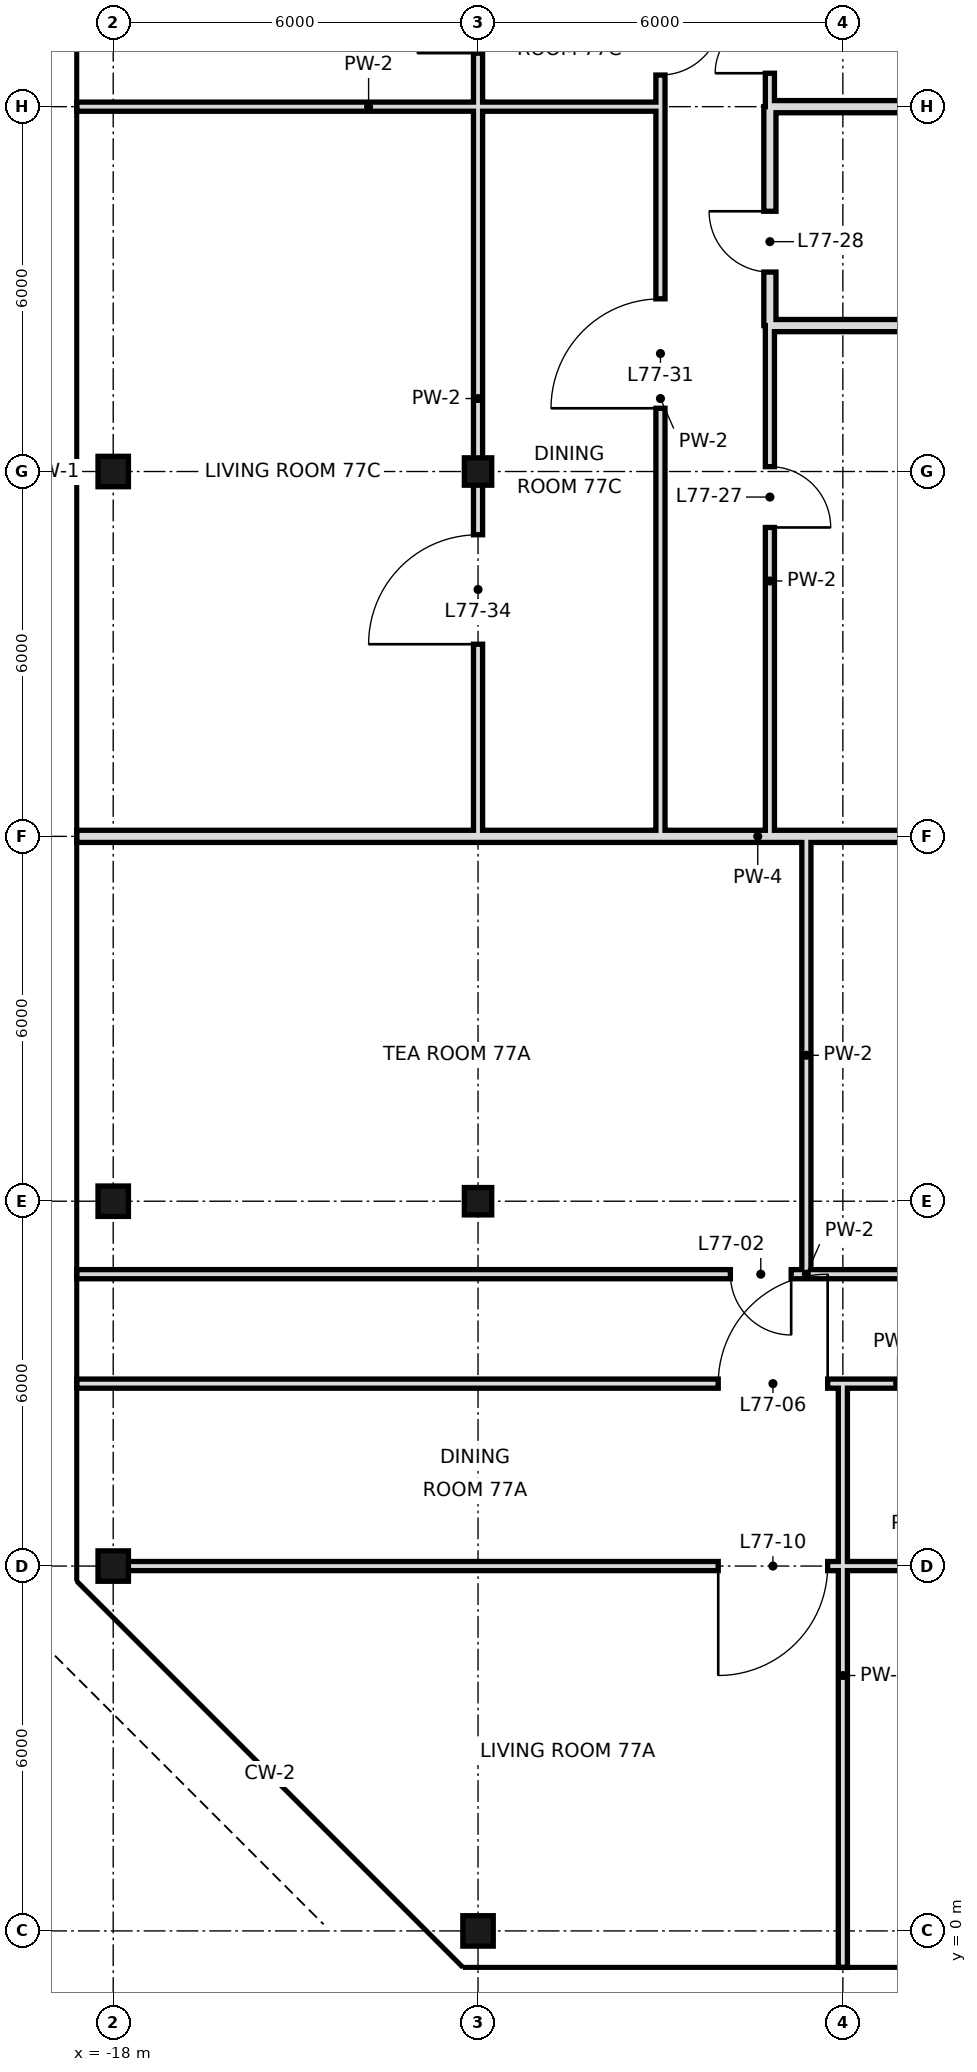
"""IFC4 building model, lengths in metres.
Left out: names, types, materials, properties, quantities, classifications, styles, units other than length and angle.
Written with IfcOpenShell. Run it as: python <this file> out.ifc"""

import sys

from ifc_helpers import new_model, si_unit, direction, frame, frame_2d, origin, origin_2d, place, context, subcontext, project, spatial, rectangle, hollow_rectangle, extrude, element, fill, save


model = new_model("IFC4")
c1 = context("Model", 3, precision=1e-05, world=origin(), true_north=direction((0.0, 1.0)))
c2 = subcontext(c1, "Body", "Model", "MODEL_VIEW")
j1 = project(units=[si_unit("LENGTHUNIT", "METRE"), si_unit("PLANEANGLEUNIT", "RADIAN")], contexts=[c1])
p1 = place(None, origin())
s1 = spatial("IfcSite", under=j1, at=p1, CompositionType="ELEMENT")
p2 = place(p1, origin())
s2 = spatial("IfcBuilding", under=s1, at=p2, CompositionType="ELEMENT")
p3 = place(p2, frame((0.0, 0.0, 323.2)))
s3 = spatial("IfcBuildingStorey", under=s2, at=p3, CompositionType="ELEMENT", Elevation=323.2)
for number, where, z_axis, x_axis in (
    (1, (-18.0, 6.0, 0.0), (0.0, 0.0, 1.0), (1.0, 0.0, 0.0)),
    (2, (-18.0, 12.0, 0.0), (0.0, 0.0, 1.0), (1.0, 0.0, 0.0)),
    (3, (-18.0, 24.0, 0.0), (0.0, 0.0, 1.0), (1.0, 0.0, 0.0)),
    (4, (-12.0, 0.0, 0.0), (0.0, 0.0, 1.0), (1.0, 0.0, 0.0)),
):
    element("IfcColumn", number, at=place(p3, frame(where, z_axis=z_axis, x_axis=x_axis)), inside=s3, PredefinedType="COLUMN", context=c2, shape_type="SweptSolid", body=[
        extrude(hollow_rectangle(XDim=0.5, YDim=0.5, WallThickness=0.025, at=origin_2d()), origin(), (0.0, 0.0, 1.0), 3.6),
    ])
for number, where, z_axis, x_axis in (
    (5, (-12.0, 12.0, 0.0), (0.0, 0.0, 1.0), (1.0, 0.0, 0.0)),
    (6, (-12.0, 24.0, 0.0), (0.0, 0.0, 1.0), (1.0, 0.0, 0.0)),
):
    element("IfcColumn", number, at=place(p3, frame(where, z_axis=z_axis, x_axis=x_axis)), inside=s3, PredefinedType="COLUMN", context=c2, shape_type="SweptSolid", body=[
        extrude(hollow_rectangle(XDim=0.45, YDim=0.45, WallThickness=0.022, at=origin_2d()), origin(), (0.0, 0.0, 1.0), 3.6),
    ])
p4 = place(p3, frame((-12.0, 18.0, 0.0), z_axis=(0.0, 0.0, 1.0), x_axis=(0.0, 1.0, 0.0)))
e7 = element("IfcWall", 7, at=p4, inside=s3, PredefinedType="PARTITIONING", context=c2, shape_type="SweptSolid", body=[
    extrude(rectangle(XDim=14.4, YDim=0.15, at=frame_2d((7.2, 0.0))), origin(), (0.0, 0.0, 1.0), 2.72),
])
p5 = place(p4, frame((3.16, 0.0, 0.0)))
e8 = element("IfcOpeningElement", 8, at=p5, cuts=e7, PredefinedType="OPENING", context=c2, shape_type="SweptSolid", body=[
    extrude(rectangle(XDim=1.8, YDim=2.4, at=frame_2d((0.9, 1.2))), frame((0.0, 0.085, 0.0), z_axis=(0.0, -1.0, 0.0), x_axis=(1.0, 0.0, 0.0)), (0.0, 0.0, 1.0), 0.17),
])
p6 = place(p4, frame((12.88, 0.0, 0.0)))
e9 = element("IfcOpeningElement", 9, at=p6, cuts=e7, PredefinedType="OPENING", context=c2, shape_type="SweptSolid", body=[
    extrude(rectangle(XDim=1.0, YDim=2.4, at=frame_2d((0.5, 1.2))), frame((0.0, 0.085, 0.0), z_axis=(0.0, -1.0, 0.0), x_axis=(1.0, 0.0, 0.0)), (0.0, 0.0, 1.0), 0.17),
])
p7 = place(p3, frame((-6.0, -0.6, 0.0), z_axis=(0.0, 0.0, 1.0), x_axis=(0.0, 1.0, 0.0)))
e10 = element("IfcWall", 10, at=p7, inside=s3, PredefinedType="PARTITIONING", context=c2, shape_type="SweptSolid", body=[
    extrude(rectangle(XDim=9.6, YDim=0.15, at=frame_2d((4.8, 0.0))), origin(), (0.0, 0.0, 1.0), 3.42),
])
p8 = place(p3, frame((-6.6, 10.8, 0.0), z_axis=(0.0, 0.0, 1.0), x_axis=(0.0, 1.0, 0.0)))
e11 = element("IfcWall", 11, at=p8, inside=s3, PredefinedType="PARTITIONING", context=c2, shape_type="SweptSolid", body=[
    extrude(rectangle(XDim=7.2, YDim=0.15, at=frame_2d((3.6, 0.0))), origin(), (0.0, 0.0, 1.0), 3.42),
])
p9 = place(p3, frame((-7.2, 26.4, 0.0), z_axis=(0.0, 0.0, 1.0), x_axis=(0.0, 1.0, 0.0)))
e12 = element("IfcWall", 12, at=p9, inside=s3, PredefinedType="SOLIDWALL", context=c2, shape_type="SweptSolid", body=[
    extrude(rectangle(XDim=3.6, YDim=0.2, at=frame_2d((1.8, 0.0))), origin(), (0.0, 0.0, 1.0), 2.72),
])
p10 = place(p9, frame((0.88, 0.0, 0.0)))
e13 = element("IfcOpeningElement", 13, at=p10, cuts=e12, PredefinedType="OPENING", context=c2, shape_type="SweptSolid", body=[
    extrude(rectangle(XDim=1.0, YDim=2.4, at=frame_2d((0.5, 1.2))), frame((0.0, 0.11, 0.0), z_axis=(0.0, -1.0, 0.0), x_axis=(1.0, 0.0, 0.0)), (0.0, 0.0, 1.0), 0.22),
])
p11 = place(p3, frame((-7.2, 18.0, 0.0), z_axis=(0.0, 0.0, 1.0), x_axis=(0.0, 1.0, 0.0)))
e14 = element("IfcWall", 14, at=p11, inside=s3, PredefinedType="PARTITIONING", context=c2, shape_type="SweptSolid", body=[
    extrude(rectangle(XDim=8.4, YDim=0.15, at=frame_2d((4.2, 0.0))), origin(), (0.0, 0.0, 1.0), 3.42),
])
p12 = place(p11, frame((5.08, 0.0, 0.0)))
e15 = element("IfcOpeningElement", 15, at=p12, cuts=e14, PredefinedType="OPENING", context=c2, shape_type="SweptSolid", body=[
    extrude(rectangle(XDim=1.0, YDim=2.4, at=frame_2d((0.5, 1.2))), frame((0.0, 0.085, 0.0), z_axis=(0.0, -1.0, 0.0), x_axis=(1.0, 0.0, 0.0)), (0.0, 0.0, 1.0), 0.17),
])
p13 = place(p3, frame((-7.2, 30.0, 0.0), z_axis=(0.0, 0.0, 1.0), x_axis=(0.0, 1.0, 0.0)))
e16 = element("IfcWall", 16, at=p13, inside=s3, PredefinedType="PARTITIONING", context=c2, shape_type="SweptSolid", body=[
    extrude(rectangle(XDim=2.4, YDim=0.15, at=frame_2d((1.2, 0.0))), origin(), (0.0, 0.0, 1.0), 3.42),
])
p14 = place(p13, frame((0.55, 0.0, 0.0)))
e17 = element("IfcOpeningElement", 17, at=p14, cuts=e16, PredefinedType="OPENING", context=c2, shape_type="SweptSolid", body=[
    extrude(rectangle(XDim=0.9, YDim=2.4, at=frame_2d((0.45, 1.2))), frame((0.0, 0.085, 0.0), z_axis=(0.0, -1.0, 0.0), x_axis=(1.0, 0.0, 0.0)), (0.0, 0.0, 1.0), 0.17),
])
p15 = place(p3, frame((-9.0, 18.0, 0.0), z_axis=(0.0, 0.0, 1.0), x_axis=(0.0, 1.0, 0.0)))
e18 = element("IfcWall", 18, at=p15, inside=s3, PredefinedType="PARTITIONING", context=c2, shape_type="SweptSolid", body=[
    extrude(rectangle(XDim=14.4, YDim=0.15, at=frame_2d((7.2, 0.0))), origin(), (0.0, 0.0, 1.0), 3.42),
])
p16 = place(p15, frame((7.04, 0.0, 0.0)))
e19 = element("IfcOpeningElement", 19, at=p16, cuts=e18, PredefinedType="OPENING", context=c2, shape_type="SweptSolid", body=[
    extrude(rectangle(XDim=1.8, YDim=2.4, at=frame_2d((0.9, 1.2))), frame((0.0, 0.085, 0.0), z_axis=(0.0, -1.0, 0.0), x_axis=(1.0, 0.0, 0.0)), (0.0, 0.0, 1.0), 0.17),
])
p17 = place(p15, frame((12.52, 0.0, 0.0)))
e20 = element("IfcOpeningElement", 20, at=p17, cuts=e18, PredefinedType="OPENING", context=c2, shape_type="SweptSolid", body=[
    extrude(rectangle(XDim=1.0, YDim=2.4, at=frame_2d((0.5, 1.2))), frame((0.0, 0.085, 0.0), z_axis=(0.0, -1.0, 0.0), x_axis=(1.0, 0.0, 0.0)), (0.0, 0.0, 1.0), 0.17),
])
p18 = place(p3, frame((-18.6, 10.8, 0.0), z_axis=(0.0, 0.0, 1.0), x_axis=(1.0, 0.0, 0.0)))
e21 = element("IfcWall", 21, at=p18, inside=s3, PredefinedType="PARTITIONING", context=c2, shape_type="SweptSolid", body=[
    extrude(rectangle(XDim=24.0, YDim=0.15, at=frame_2d((12.0, 0.0))), origin(), (0.0, 0.0, 1.0), 3.42),
])
p19 = place(p18, frame((10.75, 0.0, 0.0)))
e22 = element("IfcOpeningElement", 22, at=p19, cuts=e21, PredefinedType="OPENING", context=c2, shape_type="SweptSolid", body=[
    extrude(rectangle(XDim=1.0, YDim=2.4, at=frame_2d((0.5, 1.2))), frame((0.0, 0.085, 0.0), z_axis=(0.0, -1.0, 0.0), x_axis=(1.0, 0.0, 0.0)), (0.0, 0.0, 1.0), 0.17),
])
p20 = place(p18, frame((15.4, 0.0, 0.0)))
e23 = element("IfcOpeningElement", 23, at=p20, cuts=e21, PredefinedType="OPENING", context=c2, shape_type="SweptSolid", body=[
    extrude(rectangle(XDim=1.0, YDim=2.4, at=frame_2d((0.5, 1.2))), frame((0.0, 0.085, 0.0), z_axis=(0.0, -1.0, 0.0), x_axis=(1.0, 0.0, 0.0)), (0.0, 0.0, 1.0), 0.17),
])
p21 = place(p3, frame((-18.6, 18.0, 0.0), z_axis=(0.0, 0.0, 1.0), x_axis=(1.0, 0.0, 0.0)))
e24 = element("IfcWall", 24, at=p21, inside=s3, PredefinedType="SOLIDWALL", context=c2, shape_type="SweptSolid", body=[
    extrude(rectangle(XDim=21.7, YDim=0.2, at=frame_2d((10.85, 0.0))), origin(), (0.0, 0.0, 1.0), 2.72),
])
for number, where, z_axis, x_axis in (
    (25, (-7.2, 26.4, 0.0), (0.0, 0.0, 1.0), (1.0, 0.0, 0.0)),
    (26, (-7.2, 30.0, 0.0), (0.0, 0.0, 1.0), (1.0, 0.0, 0.0)),
):
    element("IfcWall", number, at=place(p3, frame(where, z_axis=z_axis, x_axis=x_axis)), inside=s3, PredefinedType="SOLIDWALL", context=c2, shape_type="SweptSolid", body=[
        extrude(rectangle(XDim=10.3, YDim=0.2, at=frame_2d((5.15, 0.0))), origin(), (0.0, 0.0, 1.0), 2.72),
    ])
p22 = place(p3, frame((-18.6, 30.0, 0.0), z_axis=(0.0, 0.0, 1.0), x_axis=(1.0, 0.0, 0.0)))
e27 = element("IfcWall", 27, at=p22, inside=s3, PredefinedType="PARTITIONING", context=c2, shape_type="SweptSolid", body=[
    extrude(rectangle(XDim=9.6, YDim=0.15, at=frame_2d((4.8, 0.0))), origin(), (0.0, 0.0, 1.0), 2.72),
])
p23 = place(p3, frame((-18.0, 6.0, 0.0), z_axis=(0.0, 0.0, 1.0), x_axis=(1.0, 0.0, 0.0)))
e28 = element("IfcWall", 28, at=p23, inside=s3, PredefinedType="PARTITIONING", context=c2, shape_type="SweptSolid", body=[
    extrude(rectangle(XDim=26.4, YDim=0.15, at=frame_2d((13.2, 0.0))), origin(), (0.0, 0.0, 1.0), 2.72),
])
p24 = place(p23, frame((9.95, 0.0, 0.0)))
e29 = element("IfcOpeningElement", 29, at=p24, cuts=e28, PredefinedType="OPENING", context=c2, shape_type="SweptSolid", body=[
    extrude(rectangle(XDim=1.8, YDim=2.4, at=frame_2d((0.9, 1.2))), frame((0.0, 0.085, 0.0), z_axis=(0.0, -1.0, 0.0), x_axis=(1.0, 0.0, 0.0)), (0.0, 0.0, 1.0), 0.17),
])
p25 = place(p23, frame((19.04, 0.0, 0.0)))
e30 = element("IfcOpeningElement", 30, at=p25, cuts=e28, PredefinedType="OPENING", context=c2, shape_type="SweptSolid", body=[
    extrude(rectangle(XDim=1.8, YDim=2.4, at=frame_2d((0.9, 1.2))), frame((0.0, 0.085, 0.0), z_axis=(0.0, -1.0, 0.0), x_axis=(1.0, 0.0, 0.0)), (0.0, 0.0, 1.0), 0.17),
])
p26 = place(p23, frame((24.88, 0.0, 0.0)))
e31 = element("IfcOpeningElement", 31, at=p26, cuts=e28, PredefinedType="OPENING", context=c2, shape_type="SweptSolid", body=[
    extrude(rectangle(XDim=1.0, YDim=2.4, at=frame_2d((0.5, 1.2))), frame((0.0, 0.085, 0.0), z_axis=(0.0, -1.0, 0.0), x_axis=(1.0, 0.0, 0.0)), (0.0, 0.0, 1.0), 0.17),
])
p27 = place(p3, frame((-18.6, 9.0, 0.0), z_axis=(0.0, 0.0, 1.0), x_axis=(1.0, 0.0, 0.0)))
e32 = element("IfcWall", 32, at=p27, inside=s3, PredefinedType="PARTITIONING", context=c2, shape_type="SweptSolid", body=[
    extrude(rectangle(XDim=27.0, YDim=0.15, at=frame_2d((13.5, 0.0))), origin(), (0.0, 0.0, 1.0), 3.42),
])
p28 = place(p27, frame((10.55, 0.0, 0.0)))
e33 = element("IfcOpeningElement", 33, at=p28, cuts=e32, PredefinedType="OPENING", context=c2, shape_type="SweptSolid", body=[
    extrude(rectangle(XDim=1.8, YDim=2.4, at=frame_2d((0.9, 1.2))), frame((0.0, 0.085, 0.0), z_axis=(0.0, -1.0, 0.0), x_axis=(1.0, 0.0, 0.0)), (0.0, 0.0, 1.0), 0.17),
])
p29 = place(p27, frame((15.76, 0.0, 0.0)))
e34 = element("IfcOpeningElement", 34, at=p29, cuts=e32, PredefinedType="OPENING", context=c2, shape_type="SweptSolid", body=[
    extrude(rectangle(XDim=1.8, YDim=2.4, at=frame_2d((0.9, 1.2))), frame((0.0, 0.085, 0.0), z_axis=(0.0, -1.0, 0.0), x_axis=(1.0, 0.0, 0.0)), (0.0, 0.0, 1.0), 0.17),
])
p30 = place(p27, frame((25.48, 0.0, 0.0)))
e35 = element("IfcOpeningElement", 35, at=p30, cuts=e32, PredefinedType="OPENING", context=c2, shape_type="SweptSolid", body=[
    extrude(rectangle(XDim=1.0, YDim=2.4, at=frame_2d((0.5, 1.2))), frame((0.0, 0.085, 0.0), z_axis=(0.0, -1.0, 0.0), x_axis=(1.0, 0.0, 0.0)), (0.0, 0.0, 1.0), 0.17),
])
p31 = place(p19, origin())
e36 = element("IfcDoor", 36, at=p31, inside=s3, OperationType="SINGLE_SWING_RIGHT", PredefinedType="DOOR", context=c2, shape_type="SweptSolid", body=[
    extrude(rectangle(XDim=1.0, YDim=2.4, at=frame_2d((0.5, 1.2))), frame((0.0, 0.025, 0.0), z_axis=(0.0, -1.0, 0.0), x_axis=(1.0, 0.0, 0.0)), (0.0, 0.0, 1.0), 0.05),
])
fill(e22, e36)
p32 = place(p28, frame((1.8, 0.0, 0.0), z_axis=(0.0, 0.0, 1.0), x_axis=(-1.0, 0.0, 0.0)))
e37 = element("IfcDoor", 37, at=p32, inside=s3, OperationType="SINGLE_SWING_LEFT", PredefinedType="DOOR", context=c2, shape_type="SweptSolid", body=[
    extrude(rectangle(XDim=1.8, YDim=2.4, at=frame_2d((0.9, 1.2))), frame((0.0, 0.025, 0.0), z_axis=(0.0, -1.0, 0.0), x_axis=(1.0, 0.0, 0.0)), (0.0, 0.0, 1.0), 0.05),
])
fill(e33, e37)
p33 = place(p24, frame((1.8, 0.0, 0.0), z_axis=(0.0, 0.0, 1.0), x_axis=(-1.0, 0.0, 0.0)))
e38 = element("IfcDoor", 38, at=p33, inside=s3, OperationType="SINGLE_SWING_RIGHT", PredefinedType="DOOR", context=c2, shape_type="SweptSolid", body=[
    extrude(rectangle(XDim=1.8, YDim=2.4, at=frame_2d((0.9, 1.2))), frame((0.0, 0.025, 0.0), z_axis=(0.0, -1.0, 0.0), x_axis=(1.0, 0.0, 0.0)), (0.0, 0.0, 1.0), 0.05),
])
fill(e29, e38)
p34 = place(p12, frame((1.0, 0.0, 0.0), z_axis=(0.0, 0.0, 1.0), x_axis=(-1.0, 0.0, 0.0)))
e39 = element("IfcDoor", 39, at=p34, inside=s3, OperationType="SINGLE_SWING_RIGHT", PredefinedType="DOOR", context=c2, shape_type="SweptSolid", body=[
    extrude(rectangle(XDim=1.0, YDim=2.4, at=frame_2d((0.5, 1.2))), frame((0.0, 0.025, 0.0), z_axis=(0.0, -1.0, 0.0), x_axis=(1.0, 0.0, 0.0)), (0.0, 0.0, 1.0), 0.05),
])
fill(e15, e39)
p35 = place(p10, frame((1.0, 0.0, 0.0), z_axis=(0.0, 0.0, 1.0), x_axis=(-1.0, 0.0, 0.0)))
e40 = element("IfcDoor", 40, at=p35, inside=s3, OperationType="SINGLE_SWING_LEFT", PredefinedType="DOOR", context=c2, shape_type="SweptSolid", body=[
    extrude(rectangle(XDim=1.0, YDim=2.4, at=frame_2d((0.5, 1.2))), frame((0.0, 0.025, 0.0), z_axis=(0.0, -1.0, 0.0), x_axis=(1.0, 0.0, 0.0)), (0.0, 0.0, 1.0), 0.05),
])
fill(e13, e40)
p36 = place(p14, origin())
e41 = element("IfcDoor", 41, at=p36, inside=s3, OperationType="SINGLE_SWING_LEFT", PredefinedType="DOOR", context=c2, shape_type="SweptSolid", body=[
    extrude(rectangle(XDim=0.9, YDim=2.4, at=frame_2d((0.45, 1.2))), frame((0.0, 0.025, 0.0), z_axis=(0.0, -1.0, 0.0), x_axis=(1.0, 0.0, 0.0)), (0.0, 0.0, 1.0), 0.05),
])
fill(e17, e41)
p37 = place(p16, origin())
e42 = element("IfcDoor", 42, at=p37, inside=s3, OperationType="SINGLE_SWING_LEFT", PredefinedType="DOOR", context=c2, shape_type="SweptSolid", body=[
    extrude(rectangle(XDim=1.8, YDim=2.4, at=frame_2d((0.9, 1.2))), frame((0.0, 0.025, 0.0), z_axis=(0.0, -1.0, 0.0), x_axis=(1.0, 0.0, 0.0)), (0.0, 0.0, 1.0), 0.05),
])
fill(e19, e42)
p38 = place(p17, origin())
e43 = element("IfcDoor", 43, at=p38, inside=s3, OperationType="SINGLE_SWING_RIGHT", PredefinedType="DOOR", context=c2, shape_type="SweptSolid", body=[
    extrude(rectangle(XDim=1.0, YDim=2.4, at=frame_2d((0.5, 1.2))), frame((0.0, 0.025, 0.0), z_axis=(0.0, -1.0, 0.0), x_axis=(1.0, 0.0, 0.0)), (0.0, 0.0, 1.0), 0.05),
])
fill(e20, e43)
p39 = place(p5, origin())
e44 = element("IfcDoor", 44, at=p39, inside=s3, OperationType="SINGLE_SWING_LEFT", PredefinedType="DOOR", context=c2, shape_type="SweptSolid", body=[
    extrude(rectangle(XDim=1.8, YDim=2.4, at=frame_2d((0.9, 1.2))), frame((0.0, 0.025, 0.0), z_axis=(0.0, -1.0, 0.0), x_axis=(1.0, 0.0, 0.0)), (0.0, 0.0, 1.0), 0.05),
])
fill(e8, e44)
p40 = place(p6, origin())
e45 = element("IfcDoor", 45, at=p40, inside=s3, OperationType="SINGLE_SWING_LEFT", PredefinedType="DOOR", context=c2, shape_type="SweptSolid", body=[
    extrude(rectangle(XDim=1.0, YDim=2.4, at=frame_2d((0.5, 1.2))), frame((0.0, 0.025, 0.0), z_axis=(0.0, -1.0, 0.0), x_axis=(1.0, 0.0, 0.0)), (0.0, 0.0, 1.0), 0.05),
])
fill(e9, e45)
save(model, sys.argv[1])
